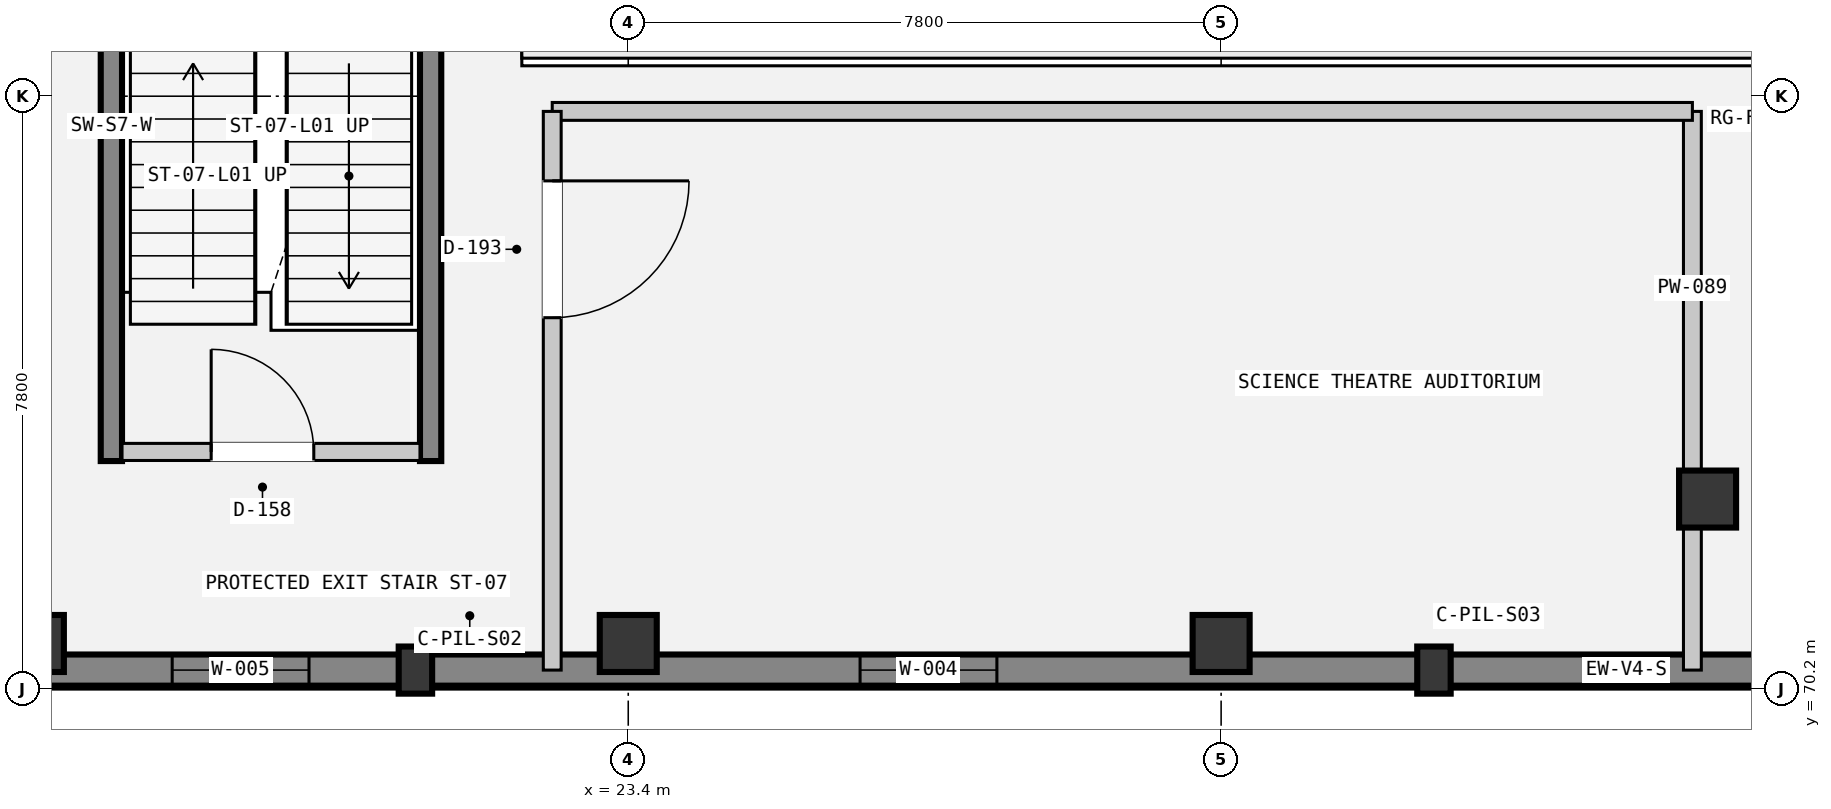
"""IFC4 building model, lengths in metres.
Left out: names, types, materials, properties, quantities, classifications, styles, units other than length and angle.
Written with IfcOpenShell. Run it as: python <this file> out.ifc"""

import sys

from ifc_helpers import new_model, si_unit, direction, frame, frame_2d, origin, origin_2d, place, context, subcontext, project, spatial, rectangle, extrude, element, fill, save


model = new_model("IFC4")
c1 = context("Model", 3, precision=1e-05, world=origin(), true_north=direction((0.0, 1.0)))
c2 = subcontext(c1, "Body", "Model", "MODEL_VIEW")
j1 = project(units=[si_unit("LENGTHUNIT", "METRE"), si_unit("PLANEANGLEUNIT", "RADIAN")], contexts=[c1])
p1 = place(None, origin())
s1 = spatial("IfcSite", under=j1, at=p1, CompositionType="ELEMENT")
p2 = place(p1, origin())
s2 = spatial("IfcBuilding", under=s1, at=p2, CompositionType="ELEMENT")
p3 = place(p2, frame((0.0, 0.0, 5.4)))
s3 = spatial("IfcBuildingStorey", under=s2, at=p3, CompositionType="ELEMENT", Elevation=5.4)
for number, where, z_axis, x_axis in (
    (1, (15.6, 70.8, 0.0), (0.0, 0.0, 1.0), (1.0, 0.0, 0.0)),
    (2, (23.4, 70.8, 0.0), (0.0, 0.0, 1.0), (1.0, 0.0, 0.0)),
    (3, (31.2, 70.8, 0.0), (0.0, 0.0, 1.0), (1.0, 0.0, 0.0)),
):
    element("IfcColumn", number, at=place(p3, frame(where, z_axis=z_axis, x_axis=x_axis)), inside=s3, PredefinedType="COLUMN", context=c2, shape_type="SweptSolid", body=[
        extrude(rectangle(XDim=0.75, YDim=0.75, at=origin_2d()), origin(), (0.0, 0.0, 1.0), 4.8),
    ])
for number, where, z_axis, x_axis in (
    (4, (20.6, 70.45, 0.0), (0.0, 0.0, 1.0), (1.0, 0.0, 0.0)),
    (5, (34.0, 70.45, 0.0), (0.0, 0.0, 1.0), (1.0, 0.0, 0.0)),
):
    element("IfcColumn", number, at=place(p3, frame(where, z_axis=z_axis, x_axis=x_axis)), inside=s3, PredefinedType="PILASTER", context=c2, shape_type="SweptSolid", body=[
        extrude(rectangle(XDim=0.44, YDim=0.62, at=origin_2d()), origin(), (0.0, 0.0, 1.0), 4.8),
    ])
p4 = place(p3, frame((37.6, 72.7, 0.0), z_axis=(0.0, 0.0, 1.0), x_axis=(1.0, 0.0, 0.0)))
e6 = element("IfcColumn", 6, at=p4, inside=s3, PredefinedType="COLUMN", context=c2, shape_type="SweptSolid", body=[
    extrude(rectangle(XDim=0.75, YDim=0.75, at=origin_2d()), origin(), (0.0, 0.0, 1.0), 4.8),
])
for number, where, z_axis, x_axis in (
    (7, (16.6, 73.2, 0.0), (0.0, 0.0, 1.0), (0.0, 1.0, 0.0)),
    (8, (20.8, 73.2, 0.0), (0.0, 0.0, 1.0), (0.0, 1.0, 0.0)),
):
    element("IfcWall", number, at=place(p3, frame(where, z_axis=z_axis, x_axis=x_axis)), inside=s3, PredefinedType="SHEAR", context=c2, shape_type="SweptSolid", body=[
        extrude(rectangle(XDim=8.4, YDim=0.28, at=frame_2d((4.2, 0.0))), origin(), (0.0, 0.0, 1.0), 4.8),
    ])
p5 = place(p3, frame((46.45, 70.45, 0.0), z_axis=(0.0, 0.0, 1.0), x_axis=(-1.0, 0.0, 0.0)))
e9 = element("IfcWall", 9, at=p5, inside=s3, PredefinedType="SOLIDWALL", context=c2, shape_type="SweptSolid", body=[
    extrude(rectangle(XDim=35.45, YDim=0.41, at=frame_2d((17.725, 0.0))), origin(), (0.0, 0.0, 1.0), 4.8),
])
p6 = place(p5, frame((2.55, 0.0, 0.95)))
e10 = element("IfcOpeningElement", 10, at=p6, cuts=e9, PredefinedType="OPENING", context=c2, shape_type="SweptSolid", body=[
    extrude(rectangle(XDim=1.8, YDim=2.1, at=frame_2d((0.9, 1.05))), frame((0.0, 0.215, 0.0), z_axis=(0.0, -1.0, 0.0), x_axis=(1.0, 0.0, 0.0)), (0.0, 0.0, 1.0), 0.43),
])
p7 = place(p5, frame((18.2, 0.0, 0.95)))
e11 = element("IfcOpeningElement", 11, at=p7, cuts=e9, PredefinedType="OPENING", context=c2, shape_type="SweptSolid", body=[
    extrude(rectangle(XDim=1.8, YDim=2.1, at=frame_2d((0.9, 1.05))), frame((0.0, 0.215, 0.0), z_axis=(0.0, -1.0, 0.0), x_axis=(1.0, 0.0, 0.0)), (0.0, 0.0, 1.0), 0.43),
])
p8 = place(p5, frame((27.25, 0.0, 0.95)))
e12 = element("IfcOpeningElement", 12, at=p8, cuts=e9, PredefinedType="OPENING", context=c2, shape_type="SweptSolid", body=[
    extrude(rectangle(XDim=1.8, YDim=2.1, at=frame_2d((0.9, 1.05))), frame((0.0, 0.215, 0.0), z_axis=(0.0, -1.0, 0.0), x_axis=(1.0, 0.0, 0.0)), (0.0, 0.0, 1.0), 0.43),
])
p9 = place(p3, frame((16.74, 73.32, 0.0), z_axis=(0.0, 0.0, 1.0), x_axis=(1.0, 0.0, 0.0)))
e13 = element("IfcWall", 13, at=p9, inside=s3, PredefinedType="PARTITIONING", context=c2, shape_type="SweptSolid", body=[
    extrude(rectangle(XDim=3.92, YDim=0.225, at=frame_2d((1.96, 0.0))), origin(), (0.0, 0.0, 1.0), 3.51),
])
p10 = place(p9, frame((1.173, 0.0, 0.0)))
e14 = element("IfcOpeningElement", 14, at=p10, cuts=e13, PredefinedType="OPENING", context=c2, shape_type="SweptSolid", body=[
    extrude(rectangle(XDim=1.35, YDim=2.2, at=frame_2d((0.675, 1.1))), frame((0.0, 0.123, 0.0), z_axis=(0.0, -1.0, 0.0), x_axis=(1.0, 0.0, 0.0)), (0.0, 0.0, 1.0), 0.245),
])
p11 = place(p3, frame((37.4, 70.45, 0.0), z_axis=(0.0, 0.0, 1.0), x_axis=(0.0, 1.0, 0.0)))
e15 = element("IfcWall", 15, at=p11, inside=s3, PredefinedType="PARTITIONING", context=c2, shape_type="SweptSolid", body=[
    extrude(rectangle(XDim=7.35, YDim=0.235, at=frame_2d((3.675, 0.0))), origin(), (0.0, 0.0, 1.0), 3.45),
])
p12 = place(p3, frame((37.4, 77.8, 0.0), z_axis=(0.0, 0.0, 1.0), x_axis=(-1.0, 0.0, 0.0)))
e16 = element("IfcWall", 16, at=p12, inside=s3, PredefinedType="PARTITIONING", context=c2, shape_type="SweptSolid", body=[
    extrude(rectangle(XDim=15.0, YDim=0.235, at=frame_2d((7.5, 0.0))), origin(), (0.0, 0.0, 1.0), 3.45),
])
p13 = place(p3, frame((22.4, 77.8, 0.0), z_axis=(0.0, 0.0, 1.0), x_axis=(0.0, -1.0, 0.0)))
e17 = element("IfcWall", 17, at=p13, inside=s3, PredefinedType="PARTITIONING", context=c2, shape_type="SweptSolid", body=[
    extrude(rectangle(XDim=7.35, YDim=0.235, at=frame_2d((3.675, 0.0))), origin(), (0.0, 0.0, 1.0), 3.45),
])
p14 = place(p13, frame((0.914, 0.0, 0.0)))
e18 = element("IfcOpeningElement", 18, at=p14, cuts=e17, PredefinedType="OPENING", context=c2, shape_type="SweptSolid", body=[
    extrude(rectangle(XDim=1.8, YDim=2.35, at=frame_2d((0.9, 1.175))), frame((0.0, 0.127, 0.0), z_axis=(0.0, -1.0, 0.0), x_axis=(1.0, 0.0, 0.0)), (0.0, 0.0, 1.0), 0.255),
])
p15 = place(p7, origin())
e19 = element("IfcWindow", 19, at=p15, inside=s3, PartitioningType="SINGLE_PANEL", PredefinedType="WINDOW", context=c2, shape_type="SweptSolid", body=[
    extrude(rectangle(XDim=1.8, YDim=2.1, at=frame_2d((0.9, 1.05))), frame((0.0, 0.03, 0.0), z_axis=(0.0, -1.0, 0.0), x_axis=(1.0, 0.0, 0.0)), (0.0, 0.0, 1.0), 0.06),
])
fill(e11, e19)
p16 = place(p8, origin())
e20 = element("IfcWindow", 20, at=p16, inside=s3, PartitioningType="SINGLE_PANEL", PredefinedType="WINDOW", context=c2, shape_type="SweptSolid", body=[
    extrude(rectangle(XDim=1.8, YDim=2.1, at=frame_2d((0.9, 1.05))), frame((0.0, 0.03, 0.0), z_axis=(0.0, -1.0, 0.0), x_axis=(1.0, 0.0, 0.0)), (0.0, 0.0, 1.0), 0.06),
])
fill(e12, e20)
p17 = place(p10, origin())
e21 = element("IfcDoor", 21, at=p17, inside=s3, OperationType="SINGLE_SWING_RIGHT", PredefinedType="DOOR", context=c2, shape_type="SweptSolid", body=[
    extrude(rectangle(XDim=1.35, YDim=2.2, at=frame_2d((0.675, 1.1))), frame((0.0, 0.025, 0.0), z_axis=(0.0, -1.0, 0.0), x_axis=(1.0, 0.0, 0.0)), (0.0, 0.0, 1.0), 0.05),
])
fill(e14, e21)
p18 = place(p14, origin())
e22 = element("IfcDoor", 22, at=p18, inside=s3, OperationType="DOUBLE_DOOR_SINGLE_SWING", PredefinedType="DOOR", context=c2, shape_type="SweptSolid", body=[
    extrude(rectangle(XDim=1.8, YDim=2.35, at=frame_2d((0.9, 1.175))), frame((0.0, 0.025, 0.0), z_axis=(0.0, -1.0, 0.0), x_axis=(1.0, 0.0, 0.0)), (0.0, 0.0, 1.0), 0.05),
])
fill(e18, e22)
save(model, sys.argv[1])
